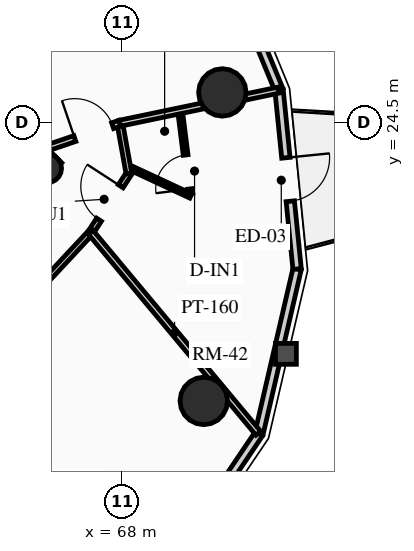
"""IFC4 building model, lengths in metres.
Left out: names, types, materials, properties, quantities, classifications, styles, units other than length and angle.
Written with IfcOpenShell. Run it as: python <this file> out.ifc"""

import sys

from ifc_helpers import new_model, si_unit, direction, frame, frame_2d, origin, origin_2d, place, context, subcontext, project, spatial, rectangle, circle, hollow_circle, extrude, source, transform, mapped, element, fill, save


model = new_model("IFC4")
c1 = context("Model", 3, precision=1e-05, world=origin(), true_north=direction((0.0, 1.0)))
c2 = subcontext(c1, "Body", "Model", "MODEL_VIEW")
j1 = project(units=[si_unit("LENGTHUNIT", "METRE"), si_unit("PLANEANGLEUNIT", "RADIAN")], contexts=[c1])
p1 = place(None, origin())
s1 = spatial("IfcSite", under=j1, at=p1, CompositionType="ELEMENT")
p2 = place(p1, origin())
s2 = spatial("IfcBuilding", under=s1, at=p2, CompositionType="ELEMENT")
p3 = place(p2, frame((0.0, 0.0, 171.97)))
s3 = spatial("IfcBuildingStorey", under=s2, at=p3, CompositionType="ELEMENT", Elevation=171.97)
p4 = place(p3, frame((66.268, 23.298, 0.0), z_axis=(0.0, 0.0, 1.0), x_axis=(-0.707106781187, 0.707106781187, 0.0)))
e1 = element("IfcWall", 1, at=p4, inside=s3, PredefinedType="SHEAR", context=c2, shape_type="SweptSolid", body=[
    extrude(rectangle(XDim=14.1, YDim=0.4, at=frame_2d((7.05, 0.0))), origin(), (0.0, 0.0, 1.0), 2.91),
])
p5 = place(p3, frame((58.561, 15.873, 0.0), z_axis=(0.0, 0.0, 1.0), x_axis=(0.707106781187, 0.707106781187, 0.0)))
e2 = element("IfcWall", 2, at=p5, inside=s3, PredefinedType="SHEAR", context=c2, shape_type="SweptSolid", body=[
    extrude(rectangle(XDim=10.7, YDim=0.4, at=frame_2d((5.35, 0.0))), origin(), (0.0, 0.0, 1.0), 2.91),
])
m1 = source(origin(), c2, "Body", "SweptSolid", [
    extrude(rectangle(XDim=1.5, YDim=2.02, at=frame_2d((0.75, 1.01))), frame((0.0, 0.21, 0.0), z_axis=(0.0, -1.0, 0.0), x_axis=(1.0, 0.0, 0.0)), (0.0, 0.0, 1.0), 0.42),
])
p6 = place(p5, frame((5.45, 0.0, 0.0)))
e3 = element("IfcOpeningElement", 3, at=p6, cuts=e2, PredefinedType="OPENING", context=c2, shape_type="MappedRepresentation", body=[
    mapped(m1, transform((0.0, 0.0, 0.0), x_axis=(1.0, 0.0, 0.0), y_axis=(0.0, 1.0, 0.0), z_axis=(0.0, 0.0, 1.0), scale=1.0)),
])
p7 = place(p3, frame((66.024, 23.294, 0.0), z_axis=(0.0, 0.0, 1.0), x_axis=(0.707106781187, 0.707106781187, 0.0)))
e4 = element("IfcColumn", 4, at=p7, inside=s3, PredefinedType="COLUMN", context=c2, shape_type="SweptSolid", body=[
    extrude(hollow_circle(Radius=0.38, WallThickness=0.032, at=origin_2d()), origin(), (0.0, 0.0, 1.0), 2.91),
])
for number, where, z_axis, x_axis in (
    (5, (70.146, 17.173, 0.0), (0.0, 0.0, 1.0), (1.0, 0.0, 0.0)),
    (6, (70.635, 25.291, 0.0), (0.0, 0.0, 1.0), (1.0, 0.0, 0.0)),
):
    element("IfcColumn", number, at=place(p3, frame(where, z_axis=z_axis, x_axis=x_axis)), inside=s3, PredefinedType="USERDEFINED", context=c2, shape_type="SweptSolid", body=[
        extrude(circle(Radius=0.625, at=origin_2d()), origin(), (0.0, 0.0, 1.0), 2.91),
    ])
p8 = place(p3, frame((71.6, 16.313, 0.0), z_axis=(0.0, 0.0, 1.0), x_axis=(-0.55951912514, -0.828817439852, 0.0)))
e7 = element("IfcWall", 7, at=p8, inside=s3, PredefinedType="SOLIDWALL", context=c2, shape_type="SweptSolid", body=[
    extrude(rectangle(XDim=4.259, YDim=0.22, at=frame_2d((2.129, 0.0))), origin(), (0.0, 0.0, 1.0), 2.245),
])
m2 = source(origin(), c2, "Body", "SweptSolid", [
    extrude(rectangle(XDim=1.6, YDim=1.3, at=frame_2d((0.8, 0.65))), frame((0.0, 0.12, 0.0), z_axis=(0.0, -1.0, 0.0), x_axis=(1.0, 0.0, 0.0)), (0.0, 0.0, 1.0), 0.24),
])
p9 = place(p8, frame((1.33, 0.0, 0.65)))
e8 = element("IfcOpeningElement", 8, at=p9, cuts=e7, PredefinedType="OPENING", context=c2, shape_type="MappedRepresentation", body=[
    mapped(m2, transform((0.0, 0.0, 0.0), x_axis=(1.0, 0.0, 0.0), y_axis=(0.0, 1.0, 0.0), z_axis=(0.0, 0.0, 1.0), scale=1.0)),
])
p10 = place(p3, frame((72.603, 20.645, 0.0), z_axis=(0.0, 0.0, 1.0), x_axis=(-0.22557328587, -0.97422620202, 0.0)))
e9 = element("IfcWall", 9, at=p10, inside=s3, PredefinedType="SOLIDWALL", context=c2, shape_type="SweptSolid", body=[
    extrude(rectangle(XDim=4.446, YDim=0.22, at=frame_2d((2.223, 0.0))), origin(), (0.0, 0.0, 1.0), 2.245),
])
p11 = place(p3, frame((72.127, 25.354, 0.0), z_axis=(0.0, 0.0, 1.0), x_axis=(0.100438356004, -0.994943283129, 0.0)))
e10 = element("IfcWall", 10, at=p11, inside=s3, PredefinedType="SOLIDWALL", context=c2, shape_type="SweptSolid", body=[
    extrude(rectangle(XDim=4.733, YDim=0.22, at=frame_2d((2.366, 0.0))), origin(), (0.0, 0.0, 1.0), 2.245),
])
m3 = source(origin(), c2, "Body", "SweptSolid", [
    extrude(rectangle(XDim=1.15, YDim=2.005, at=frame_2d((0.575, 1.002))), frame((0.0, 0.12, 0.0), z_axis=(0.0, -1.0, 0.0), x_axis=(1.0, 0.0, 0.0)), (0.0, 0.0, 1.0), 0.24),
])
p12 = place(p11, frame((1.791, 0.0, 0.0)))
e11 = element("IfcOpeningElement", 11, at=p12, cuts=e10, PredefinedType="OPENING", context=c2, shape_type="MappedRepresentation", body=[
    mapped(m3, transform((0.0, 0.0, 0.0), x_axis=(1.0, 0.0, 0.0), y_axis=(0.0, 1.0, 0.0), z_axis=(0.0, 0.0, 1.0), scale=1.0)),
])
p13 = place(p3, frame((70.22, 29.979, 0.0), z_axis=(0.0, 0.0, 1.0), x_axis=(0.381196434348, -0.924494066201, 0.0)))
e12 = element("IfcWall", 12, at=p13, inside=s3, PredefinedType="SOLIDWALL", context=c2, shape_type="SweptSolid", body=[
    extrude(rectangle(XDim=5.003, YDim=0.22, at=frame_2d((2.501, 0.0))), origin(), (0.0, 0.0, 1.0), 2.245),
])
p14 = place(p3, frame((62.756, 16.873, 0.0), z_axis=(0.0, 0.0, 1.0), x_axis=(0.682136885079, 0.73122450042, 0.0)))
e13 = element("IfcWall", 13, at=p14, inside=s3, PredefinedType="PARTITIONING", context=c2, shape_type="SweptSolid", body=[
    extrude(rectangle(XDim=6.476, YDim=0.15, at=frame_2d((3.238, 0.0))), origin(), (0.0, 0.0, 1.0), 2.245),
])
m4 = source(origin(), c2, "Body", "SweptSolid", [
    extrude(rectangle(XDim=1.05, YDim=2.015, at=frame_2d((0.525, 1.007))), frame((0.0, 0.085, 0.0), z_axis=(0.0, -1.0, 0.0), x_axis=(1.0, 0.0, 0.0)), (0.0, 0.0, 1.0), 0.17),
])
p15 = place(p14, frame((2.713, 0.0, 0.0)))
e14 = element("IfcOpeningElement", 14, at=p15, cuts=e13, PredefinedType="OPENING", context=c2, shape_type="MappedRepresentation", body=[
    mapped(m4, transform((0.0, 0.0, 0.0), x_axis=(1.0, 0.0, 0.0), y_axis=(0.0, 1.0, 0.0), z_axis=(0.0, 0.0, 1.0), scale=1.0)),
])
p16 = place(p3, frame((67.173, 21.608, 0.0), z_axis=(0.0, 0.0, 1.0), x_axis=(0.544299403682, 0.838891029367, 0.0)))
e15 = element("IfcWall", 15, at=p16, inside=s3, PredefinedType="PARTITIONING", context=c2, shape_type="SweptSolid", body=[
    extrude(rectangle(XDim=1.844, YDim=0.15, at=frame_2d((0.922, 0.0))), origin(), (0.0, 0.0, 1.0), 2.245),
])
p17 = place(p16, frame((0.397, 0.0, 0.0)))
e16 = element("IfcOpeningElement", 16, at=p17, cuts=e15, PredefinedType="OPENING", context=c2, shape_type="MappedRepresentation", body=[
    mapped(m4, transform((0.0, 0.0, 0.0), x_axis=(1.0, 0.0, 0.0), y_axis=(0.0, 1.0, 0.0), z_axis=(0.0, 0.0, 1.0), scale=1.0)),
])
p18 = place(p3, frame((68.177, 23.155, 0.0), z_axis=(0.0, 0.0, 1.0), x_axis=(-0.1778483434, 0.98405790823, 0.0)))
e17 = element("IfcWall", 17, at=p18, inside=s3, PredefinedType="PARTITIONING", context=c2, shape_type="SweptSolid", body=[
    extrude(rectangle(XDim=1.347, YDim=0.15, at=frame_2d((0.673, 0.0))), origin(), (0.0, 0.0, 1.0), 2.245),
])
p19 = place(p3, frame((67.173, 21.608, 0.0), z_axis=(0.0, 0.0, 1.0), x_axis=(0.64050880156, -0.767950828585, 0.0)))
e18 = element("IfcWall", 18, at=p19, inside=s3, PredefinedType="PARTITIONING", context=c2, shape_type="SweptSolid", body=[
    extrude(rectangle(XDim=6.883, YDim=0.16, at=frame_2d((3.441, 0.0))), origin(), (0.0, 0.0, 1.0), 2.245),
])
p20 = place(p3, frame((67.938, 24.48, 0.0), z_axis=(0.0, 0.0, 1.0), x_axis=(0.978917914143, 0.204254051051, 0.0)))
e19 = element("IfcWall", 19, at=p20, inside=s3, PredefinedType="PARTITIONING", context=c2, shape_type="SweptSolid", body=[
    extrude(rectangle(XDim=4.26, YDim=0.16, at=frame_2d((2.13, 0.0))), origin(), (0.0, 0.0, 1.0), 2.245),
])
p21 = place(p3, frame((66.021, 23.828, 0.0), z_axis=(0.0, 0.0, 1.0), x_axis=(0.946687463515, 0.32215345167, 0.0)))
e20 = element("IfcWall", 20, at=p21, inside=s3, PredefinedType="PARTITIONING", context=c2, shape_type="SweptSolid", body=[
    extrude(rectangle(XDim=2.025, YDim=0.16, at=frame_2d((1.012, 0.0))), origin(), (0.0, 0.0, 1.0), 2.245),
])
m5 = source(origin(), c2, "Body", "SweptSolid", [
    extrude(rectangle(XDim=1.05, YDim=2.015, at=frame_2d((0.525, 1.007))), frame((0.0, 0.09, 0.0), z_axis=(0.0, -1.0, 0.0), x_axis=(1.0, 0.0, 0.0)), (0.0, 0.0, 1.0), 0.18),
])
p22 = place(p21, frame((0.775, 0.0, 0.0)))
e21 = element("IfcOpeningElement", 21, at=p22, cuts=e20, PredefinedType="OPENING", context=c2, shape_type="MappedRepresentation", body=[
    mapped(m5, transform((0.0, 0.0, 0.0), x_axis=(1.0, 0.0, 0.0), y_axis=(0.0, 1.0, 0.0), z_axis=(0.0, 0.0, 1.0), scale=1.0)),
])
p23 = place(p3, frame((68.275, 23.28, 0.0), z_axis=(0.0, 0.0, 1.0), x_axis=(0.906681243062, -0.421816457099, 0.0)))
e22 = element("IfcWall", 22, at=p23, inside=s3, PredefinedType="PARTITIONING", context=c2, shape_type="SweptSolid", body=[
    extrude(rectangle(XDim=1.688, YDim=0.125, at=frame_2d((0.844, 0.0))), origin(), (0.0, 0.0, 1.0), 2.675),
])
p24 = place(p3, frame((69.797, 22.633, 0.0), z_axis=(0.0, 0.0, 1.0), x_axis=(-0.125234581717, 0.992127158958, 0.0)))
e23 = element("IfcWall", 23, at=p24, inside=s3, PredefinedType="PARTITIONING", context=c2, shape_type="SweptSolid", body=[
    extrude(rectangle(XDim=2.104, YDim=0.125, at=frame_2d((1.052, 0.0))), origin(), (0.0, 0.0, 1.0), 2.245),
])
m6 = source(origin(), c2, "Body", "SweptSolid", [
    extrude(rectangle(XDim=0.9, YDim=2.005, at=frame_2d((0.45, 1.002))), frame((0.0, 0.073, 0.0), z_axis=(0.0, -1.0, 0.0), x_axis=(1.0, 0.0, 0.0)), (0.0, 0.0, 1.0), 0.145),
])
p25 = place(p24, frame((0.12, 0.0, 0.0)))
e24 = element("IfcOpeningElement", 24, at=p25, cuts=e23, PredefinedType="OPENING", context=c2, shape_type="MappedRepresentation", body=[
    mapped(m6, transform((0.0, 0.0, 0.0), x_axis=(1.0, 0.0, 0.0), y_axis=(0.0, 1.0, 0.0), z_axis=(0.0, 0.0, 1.0), scale=1.0)),
])
m7 = source(origin(), c2, "Body", "SweptSolid", [
    extrude(rectangle(XDim=1.15, YDim=2.005, at=frame_2d((0.575, 1.002))), frame((0.0, 0.025, 0.0), z_axis=(0.0, -1.0, 0.0), x_axis=(1.0, 0.0, 0.0)), (0.0, 0.0, 1.0), 0.05),
])
p26 = place(p12, origin())
e25 = element("IfcDoor", 25, at=p26, inside=s3, OperationType="SINGLE_SWING_LEFT", PredefinedType="DOOR", context=c2, shape_type="MappedRepresentation", body=[
    mapped(m7, transform((0.0, 0.0, 0.0), x_axis=(1.0, 0.0, 0.0), y_axis=(0.0, 1.0, 0.0), z_axis=(0.0, 0.0, 1.0), scale=1.0)),
])
fill(e11, e25)
m8 = source(origin(), c2, "Body", "SweptSolid", [
    extrude(rectangle(XDim=1.05, YDim=2.015, at=frame_2d((0.525, 1.007))), frame((0.0, 0.025, 0.0), z_axis=(0.0, -1.0, 0.0), x_axis=(1.0, 0.0, 0.0)), (0.0, 0.0, 1.0), 0.05),
])
p27 = place(p22, origin())
e26 = element("IfcDoor", 26, at=p27, inside=s3, OperationType="SINGLE_SWING_LEFT", PredefinedType="DOOR", context=c2, shape_type="MappedRepresentation", body=[
    mapped(m8, transform((0.0, 0.0, 0.0), x_axis=(1.0, 0.0, 0.0), y_axis=(0.0, 1.0, 0.0), z_axis=(0.0, 0.0, 1.0), scale=1.0)),
])
fill(e21, e26)
p28 = place(p17, origin())
e27 = element("IfcDoor", 27, at=p28, inside=s3, OperationType="SINGLE_SWING_RIGHT", PredefinedType="DOOR", context=c2, shape_type="MappedRepresentation", body=[
    mapped(m8, transform((0.0, 0.0, 0.0), x_axis=(1.0, 0.0, 0.0), y_axis=(0.0, 1.0, 0.0), z_axis=(0.0, 0.0, 1.0), scale=1.0)),
])
fill(e16, e27)
m9 = source(origin(), c2, "Body", "SweptSolid", [
    extrude(rectangle(XDim=0.9, YDim=2.005, at=frame_2d((0.45, 1.002))), frame((0.0, 0.025, 0.0), z_axis=(0.0, -1.0, 0.0), x_axis=(1.0, 0.0, 0.0)), (0.0, 0.0, 1.0), 0.05),
])
p29 = place(p25, origin())
e28 = element("IfcDoor", 28, at=p29, inside=s3, OperationType="SINGLE_SWING_LEFT", PredefinedType="DOOR", context=c2, shape_type="MappedRepresentation", body=[
    mapped(m9, transform((0.0, 0.0, 0.0), x_axis=(1.0, 0.0, 0.0), y_axis=(0.0, 1.0, 0.0), z_axis=(0.0, 0.0, 1.0), scale=1.0)),
])
fill(e24, e28)
save(model, sys.argv[1])
